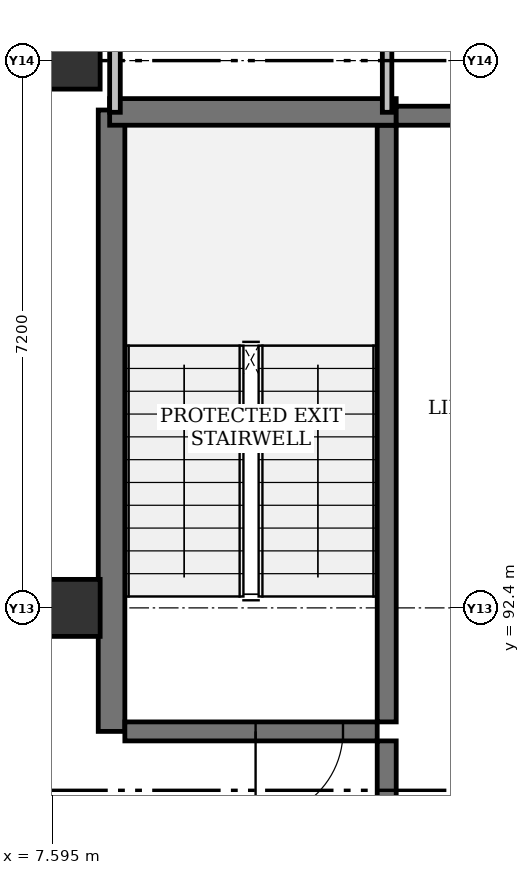
"""IFC4 building model, lengths in metres.
Left out: names, types, materials, properties, quantities, classifications, styles, units other than length and angle.
Written with IfcOpenShell. Run it as: python <this file> out.ifc"""

import sys

from ifc_helpers import new_model, si_unit, direction, frame, frame_2d, origin, origin_2d, place, context, subcontext, project, spatial, rectangle, extrude, element, fill, save


model = new_model("IFC4")
c1 = context("Model", 3, precision=1e-05, world=origin(), true_north=direction((0.0, 1.0)))
c2 = subcontext(c1, "Body", "Model", "MODEL_VIEW")
j1 = project(units=[si_unit("LENGTHUNIT", "METRE"), si_unit("PLANEANGLEUNIT", "RADIAN")], contexts=[c1])
p1 = place(None, origin())
s1 = spatial("IfcSite", under=j1, at=p1, CompositionType="ELEMENT")
p2 = place(p1, origin())
s2 = spatial("IfcBuilding", under=s1, at=p2, CompositionType="ELEMENT")
p3 = place(p2, frame((0.0, 0.0, -4.2)))
s3 = spatial("IfcBuildingStorey", under=s2, at=p3, CompositionType="ELEMENT", Elevation=-4.2)
for number, where, z_axis, x_axis in (
    (1, (7.85, 92.4, 0.0), (0.0, 0.0, 1.0), (1.0, 0.0, 0.0)),
    (2, (7.85, 99.6, 0.0), (0.0, 0.0, 1.0), (1.0, 0.0, 0.0)),
):
    element("IfcColumn", number, at=place(p3, frame(where, z_axis=z_axis, x_axis=x_axis)), inside=s3, PredefinedType="COLUMN", context=c2, shape_type="SweptSolid", body=[
        extrude(rectangle(XDim=0.75, YDim=0.75, at=origin_2d()), origin(), (0.0, 0.0, 1.0), 4.2),
    ])
p4 = place(p3, frame((8.375, 90.775, 0.0), z_axis=(0.0, 0.0, 1.0), x_axis=(0.0, 1.0, 0.0)))
e3 = element("IfcWall", 3, at=p4, inside=s3, PredefinedType="SHEAR", context=c2, shape_type="SweptSolid", body=[
    extrude(rectangle(XDim=8.175, YDim=0.35, at=frame_2d((4.087, 0.0))), origin(), (0.0, 0.0, 1.0), 4.2),
])
p5 = place(p3, frame((11.995, 90.9, 0.0), z_axis=(0.0, 0.0, 1.0), x_axis=(0.0, 1.0, 0.0)))
e4 = element("IfcWall", 4, at=p5, inside=s3, PredefinedType="SHEAR", context=c2, shape_type="SweptSolid", body=[
    extrude(rectangle(XDim=7.85, YDim=0.25, at=frame_2d((3.925, 0.0))), origin(), (0.0, 0.0, 1.0), 4.2),
])
p6 = place(p3, frame((11.995, 86.75, 0.0), z_axis=(0.0, 0.0, 1.0), x_axis=(0.0, 1.0, 0.0)))
e5 = element("IfcWall", 5, at=p6, inside=s3, PredefinedType="SHEAR", context=c2, shape_type="SweptSolid", body=[
    extrude(rectangle(XDim=3.9, YDim=0.25, at=frame_2d((1.95, 0.0))), origin(), (0.0, 0.0, 1.0), 4.2),
])
p7 = place(p6, frame((1.3, 0.0, 0.0)))
e6 = element("IfcOpeningElement", 6, at=p7, cuts=e5, PredefinedType="OPENING", context=c2, shape_type="SweptSolid", body=[
    extrude(rectangle(XDim=1.25, YDim=2.2, at=frame_2d((0.625, 1.1))), frame((0.0, 0.125, 0.0), z_axis=(0.0, -1.0, 0.0), x_axis=(1.0, 0.0, 0.0)), (0.0, 0.0, 1.0), 0.25),
])
p8 = place(p3, frame((8.35, 98.925, 0.0), z_axis=(0.0, 0.0, 1.0), x_axis=(1.0, 0.0, 0.0)))
e7 = element("IfcWall", 7, at=p8, inside=s3, PredefinedType="SHEAR", context=c2, shape_type="SweptSolid", body=[
    extrude(rectangle(XDim=3.77, YDim=0.35, at=frame_2d((1.885, 0.0))), origin(), (0.0, 0.0, 1.0), 4.2),
])
p9 = place(p3, frame((12.12, 98.875, 0.0), z_axis=(0.0, 0.0, 1.0), x_axis=(1.0, 0.0, 0.0)))
e8 = element("IfcWall", 8, at=p9, inside=s3, PredefinedType="SHEAR", context=c2, shape_type="SweptSolid", body=[
    extrude(rectangle(XDim=4.03, YDim=0.25, at=frame_2d((2.015, 0.0))), origin(), (0.0, 0.0, 1.0), 4.2),
])
p10 = place(p9, frame((1.35, 0.0, 0.0)))
e9 = element("IfcOpeningElement", 9, at=p10, cuts=e8, PredefinedType="OPENING", context=c2, shape_type="SweptSolid", body=[
    extrude(rectangle(XDim=1.3, YDim=2.2, at=frame_2d((0.65, 1.1))), frame((0.0, 0.125, 0.0), z_axis=(0.0, -1.0, 0.0), x_axis=(1.0, 0.0, 0.0)), (0.0, 0.0, 1.0), 0.25),
])
p11 = place(p3, frame((11.87, 90.775, 0.0), z_axis=(0.0, 0.0, 1.0), x_axis=(-1.0, 0.0, 0.0)))
e10 = element("IfcWall", 10, at=p11, inside=s3, PredefinedType="SHEAR", context=c2, shape_type="SweptSolid", body=[
    extrude(rectangle(XDim=3.32, YDim=0.25, at=frame_2d((1.66, 0.0))), origin(), (0.0, 0.0, 1.0), 4.2),
])
p12 = place(p11, frame((0.45, 0.0, 0.0)))
e11 = element("IfcOpeningElement", 11, at=p12, cuts=e10, PredefinedType="OPENING", context=c2, shape_type="SweptSolid", body=[
    extrude(rectangle(XDim=1.15, YDim=2.15, at=frame_2d((0.575, 1.075))), frame((0.0, 0.125, 0.0), z_axis=(0.0, -1.0, 0.0), x_axis=(1.0, 0.0, 0.0)), (0.0, 0.0, 1.0), 0.25),
])
p13 = place(p3, frame((8.42, 98.92, 0.0), z_axis=(0.0, 0.0, 1.0), x_axis=(0.0, 1.0, 0.0)))
e12 = element("IfcWall", 12, at=p13, inside=s3, PredefinedType="PARTITIONING", context=c2, shape_type="SweptSolid", body=[
    extrude(rectangle(XDim=2.74, YDim=0.14, at=frame_2d((1.37, 0.0))), origin(), (0.0, 0.0, 1.0), 3.401),
])
p14 = place(p3, frame((12.0, 101.6, 0.0), z_axis=(0.0, 0.0, 1.0), x_axis=(0.0, -1.0, 0.0)))
e13 = element("IfcWall", 13, at=p14, inside=s3, PredefinedType="PARTITIONING", context=c2, shape_type="SweptSolid", body=[
    extrude(rectangle(XDim=2.68, YDim=0.125, at=frame_2d((1.34, 0.0))), origin(), (0.0, 0.0, 1.0), 3.401),
])
p15 = place(p14, frame((0.85, 0.0, 0.0)))
e14 = element("IfcOpeningElement", 14, at=p15, cuts=e13, PredefinedType="OPENING", context=c2, shape_type="SweptSolid", body=[
    extrude(rectangle(XDim=0.98, YDim=2.1, at=frame_2d((0.49, 1.05))), frame((0.0, 0.062, 0.0), z_axis=(0.0, -1.0, 0.0), x_axis=(1.0, 0.0, 0.0)), (0.0, 0.0, 1.0), 0.125),
])
p16 = place(p12, origin())
e15 = element("IfcDoor", 15, at=p16, inside=s3, OperationType="SINGLE_SWING_RIGHT", PredefinedType="DOOR", context=c2, shape_type="SweptSolid", body=[
    extrude(rectangle(XDim=1.15, YDim=2.15, at=frame_2d((0.575, 1.075))), frame((0.0, 0.025, 0.0), z_axis=(0.0, -1.0, 0.0), x_axis=(1.0, 0.0, 0.0)), (0.0, 0.0, 1.0), 0.05),
])
fill(e11, e15)
save(model, sys.argv[1])
